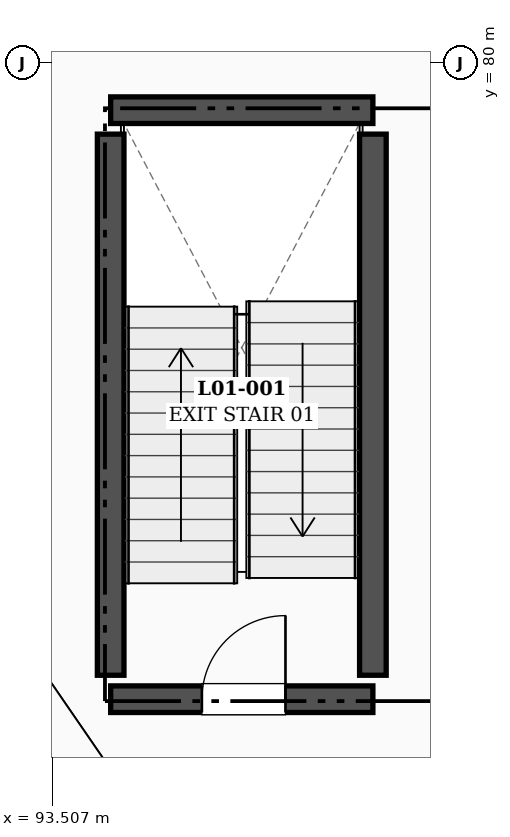
"""IFC4 building model, lengths in metres.
Left out: names, types, materials, properties, quantities, classifications, styles, units other than length and angle.
Written with IfcOpenShell. Run it as: python <this file> out.ifc"""

import sys

from ifc_helpers import new_model, si_unit, direction, frame, frame_2d, origin, place, context, subcontext, project, spatial, rectangle, extrude, element, fill, save


model = new_model("IFC4")
c1 = context("Model", 3, precision=1e-05, world=origin(), true_north=direction((0.0, 1.0)))
c2 = subcontext(c1, "Body", "Model", "MODEL_VIEW")
j1 = project(units=[si_unit("LENGTHUNIT", "METRE"), si_unit("PLANEANGLEUNIT", "RADIAN")], contexts=[c1])
p1 = place(None, origin())
s1 = spatial("IfcSite", under=j1, at=p1, CompositionType="ELEMENT")
p2 = place(p1, origin())
s2 = spatial("IfcBuilding", under=s1, at=p2, CompositionType="ELEMENT")
p3 = place(p2, frame((0.0, 0.0, 6.0)))
s3 = spatial("IfcBuildingStorey", under=s2, at=p3, CompositionType="ELEMENT", Elevation=6.0)
p4 = place(p3, frame((97.992, 82.303, 0.0), z_axis=(0.0, 0.0, 1.0), x_axis=(-0.95182847269, -0.30663098111, 0.0)))
e1 = element("IfcWall", 1, at=p4, inside=s3, PredefinedType="SOLIDWALL", context=c2, shape_type="SweptSolid", body=[
    extrude(rectangle(XDim=9.785, YDim=0.32, at=frame_2d((4.893, 0.0))), origin(), (0.0, 0.0, 1.0), 3.61),
])
p5 = place(p4, frame((0.95, 0.0, 0.95)))
e2 = element("IfcOpeningElement", 2, at=p5, cuts=e1, PredefinedType="OPENING", context=c2, shape_type="SweptSolid", body=[
    extrude(rectangle(XDim=2.4, YDim=2.1, at=frame_2d((1.2, 1.05))), frame((0.0, 0.17, 0.0), z_axis=(0.0, -1.0, 0.0), x_axis=(1.0, 0.0, 0.0)), (0.0, 0.0, 1.0), 0.34),
])
p6 = place(p4, frame((6.435, 0.0, 0.95)))
e3 = element("IfcOpeningElement", 3, at=p6, cuts=e1, PredefinedType="OPENING", context=c2, shape_type="SweptSolid", body=[
    extrude(rectangle(XDim=2.4, YDim=2.1, at=frame_2d((1.2, 1.05))), frame((0.0, 0.17, 0.0), z_axis=(0.0, -1.0, 0.0), x_axis=(1.0, 0.0, 0.0)), (0.0, 0.0, 1.0), 0.34),
])
p7 = place(p3, frame((94.275, 71.625, 0.0), z_axis=(0.0, 0.0, 1.0), x_axis=(1.0, 0.0, 0.0)))
e4 = element("IfcWall", 4, at=p7, inside=s3, PredefinedType="SHEAR", context=c2, shape_type="SweptSolid", body=[
    extrude(rectangle(XDim=3.45, YDim=0.35, at=frame_2d((1.725, 0.0))), origin(), (0.0, 0.0, 1.0), 4.8),
])
p8 = place(p7, frame((1.2, 0.0, 0.0)))
e5 = element("IfcOpeningElement", 5, at=p8, cuts=e4, PredefinedType="OPENING", context=c2, shape_type="SweptSolid", body=[
    extrude(rectangle(XDim=1.1, YDim=2.2, at=frame_2d((0.55, 1.1))), frame((0.0, 0.185, 0.0), z_axis=(0.0, -1.0, 0.0), x_axis=(1.0, 0.0, 0.0)), (0.0, 0.0, 1.0), 0.37),
])
p9 = place(p3, frame((94.275, 79.375, 0.0), z_axis=(0.0, 0.0, 1.0), x_axis=(1.0, 0.0, 0.0)))
e6 = element("IfcWall", 6, at=p9, inside=s3, PredefinedType="SHEAR", context=c2, shape_type="SweptSolid", body=[
    extrude(rectangle(XDim=3.45, YDim=0.35, at=frame_2d((1.725, 0.0))), origin(), (0.0, 0.0, 1.0), 4.8),
])
for number, where, z_axis, x_axis in (
    (7, (94.275, 71.94, 0.0), (0.0, 0.0, 1.0), (0.0, 1.0, 0.0)),
    (8, (97.725, 71.94, 0.0), (0.0, 0.0, 1.0), (0.0, 1.0, 0.0)),
):
    element("IfcWall", number, at=place(p3, frame(where, z_axis=z_axis, x_axis=x_axis)), inside=s3, PredefinedType="SHEAR", context=c2, shape_type="SweptSolid", body=[
        extrude(rectangle(XDim=7.12, YDim=0.35, at=frame_2d((3.56, 0.0))), origin(), (0.0, 0.0, 1.0), 4.8),
    ])
p10 = place(p3, frame((95.773, 68.792, 0.0), z_axis=(0.0, 0.0, 1.0), x_axis=(0.951789962688, 0.306750496211, 0.0)))
e9 = element("IfcWall", 9, at=p10, inside=s3, PredefinedType="PARTITIONING", context=c2, shape_type="SweptSolid", body=[
    extrude(rectangle(XDim=6.758, YDim=0.14, at=frame_2d((3.379, 0.0))), origin(), (0.0, 0.0, 1.0), 3.56),
])
p11 = place(p8, origin())
e10 = element("IfcDoor", 10, at=p11, inside=s3, OperationType="SINGLE_SWING_RIGHT", PredefinedType="DOOR", context=c2, shape_type="SweptSolid", body=[
    extrude(rectangle(XDim=1.1, YDim=2.2, at=frame_2d((0.55, 1.1))), frame((0.0, 0.025, 0.0), z_axis=(0.0, -1.0, 0.0), x_axis=(1.0, 0.0, 0.0)), (0.0, 0.0, 1.0), 0.05),
])
fill(e5, e10)
save(model, sys.argv[1])
